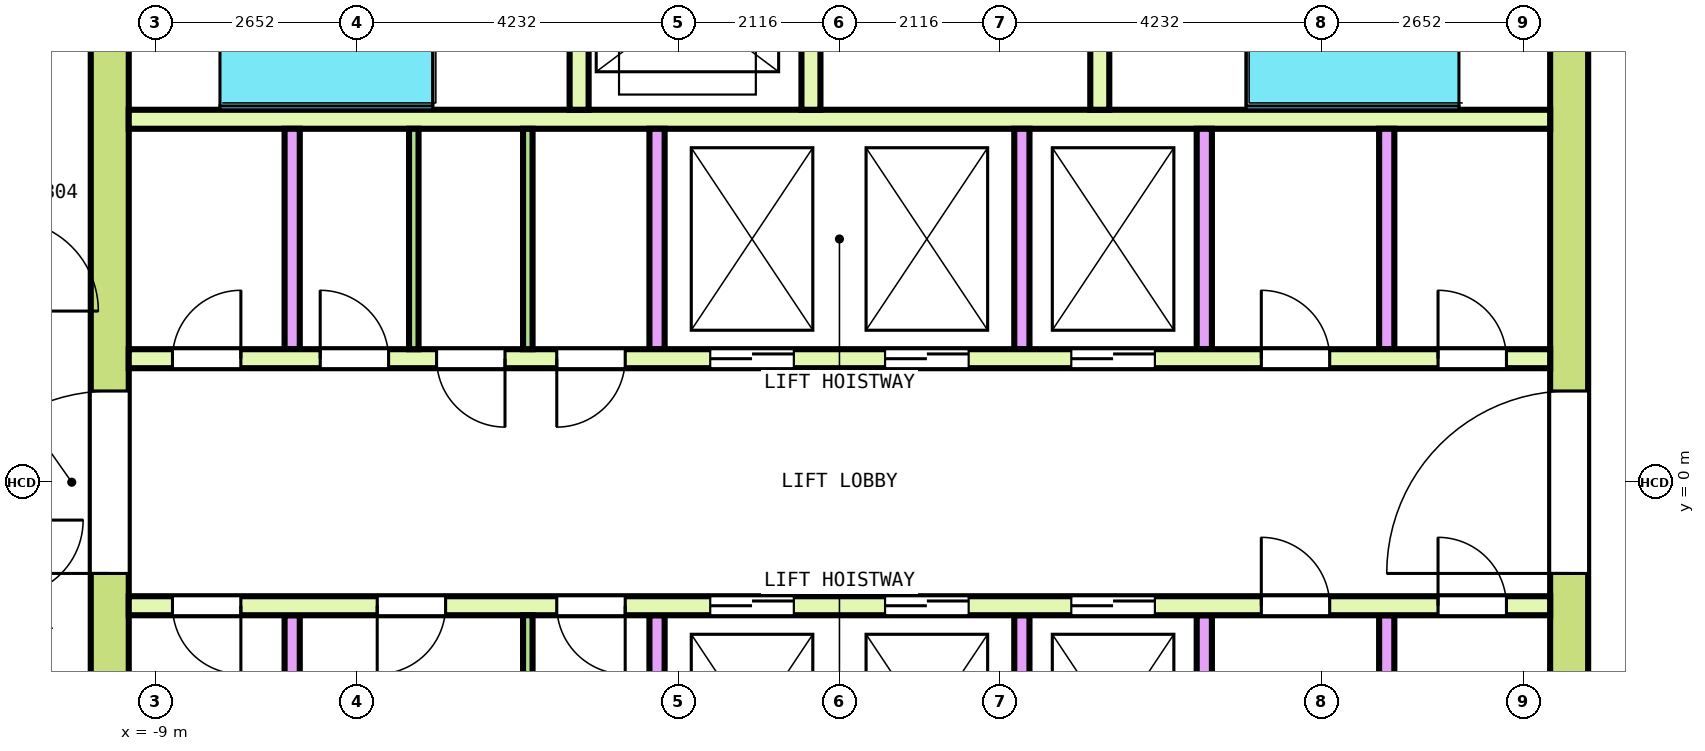
"""IFC4 building model, lengths in metres.
Left out: names, types, materials, properties, quantities, classifications, styles, units other than length and angle.
Written with IfcOpenShell. Run it as: python <this file> out.ifc"""

import sys

from ifc_helpers import new_model, si_unit, direction, frame, frame_2d, origin, place, context, subcontext, project, spatial, rectangle, extrude, element, fill, save


model = new_model("IFC4")
c1 = context("Model", 3, precision=1e-05, world=origin(), true_north=direction((0.0, 1.0)))
c2 = subcontext(c1, "Body", "Model", "MODEL_VIEW")
j1 = project(units=[si_unit("LENGTHUNIT", "METRE"), si_unit("PLANEANGLEUNIT", "RADIAN")], contexts=[c1])
p1 = place(None, origin())
s1 = spatial("IfcSite", under=j1, at=p1, CompositionType="ELEMENT")
p2 = place(p1, origin())
s2 = spatial("IfcBuilding", under=s1, at=p2, CompositionType="ELEMENT")
p3 = place(p2, frame((0.0, 0.0, 312.6)))
s3 = spatial("IfcBuildingStorey", under=s2, at=p3, CompositionType="ELEMENT", Elevation=312.6)
p4 = place(p3, frame((-9.6, -7.85, 0.0), z_axis=(0.0, 0.0, 1.0), x_axis=(0.0, 1.0, 0.0)))
e1 = element("IfcWall", 1, at=p4, inside=s3, PredefinedType="SHEAR", context=c2, shape_type="SweptSolid", body=[
    extrude(rectangle(XDim=15.7, YDim=0.5, at=frame_2d((7.85, 0.0))), origin(), (0.0, 0.0, 1.0), 3.7),
])
p5 = place(p4, frame((6.65, 0.0, 0.0)))
e2 = element("IfcOpeningElement", 2, at=p5, cuts=e1, PredefinedType="OPENING", context=c2, shape_type="SweptSolid", body=[
    extrude(rectangle(XDim=2.4, YDim=2.1, at=frame_2d((1.2, 1.05))), frame((0.0, 0.26, 0.0), z_axis=(0.0, -1.0, 0.0), x_axis=(1.0, 0.0, 0.0)), (0.0, 0.0, 1.0), 0.52),
])
p6 = place(p4, frame((13.55, 0.0, 0.0)))
e3 = element("IfcOpeningElement", 3, at=p6, cuts=e1, PredefinedType="OPENING", context=c2, shape_type="SweptSolid", body=[
    extrude(rectangle(XDim=1.2, YDim=2.1, at=frame_2d((0.6, 1.05))), frame((0.0, 0.26, 0.0), z_axis=(0.0, -1.0, 0.0), x_axis=(1.0, 0.0, 0.0)), (0.0, 0.0, 1.0), 0.52),
])
p7 = place(p4, frame((0.95, 0.0, 0.0)))
e4 = element("IfcOpeningElement", 4, at=p7, cuts=e1, PredefinedType="OPENING", context=c2, shape_type="SweptSolid", body=[
    extrude(rectangle(XDim=1.2, YDim=2.1, at=frame_2d((0.6, 1.05))), frame((0.0, 0.26, 0.0), z_axis=(0.0, -1.0, 0.0), x_axis=(1.0, 0.0, 0.0)), (0.0, 0.0, 1.0), 0.52),
])
p8 = place(p3, frame((9.6, -7.85, 0.0), z_axis=(0.0, 0.0, 1.0), x_axis=(0.0, 1.0, 0.0)))
e5 = element("IfcWall", 5, at=p8, inside=s3, PredefinedType="SHEAR", context=c2, shape_type="SweptSolid", body=[
    extrude(rectangle(XDim=15.7, YDim=0.5, at=frame_2d((7.85, 0.0))), origin(), (0.0, 0.0, 1.0), 3.7),
])
p9 = place(p8, frame((6.65, 0.0, 0.0)))
e6 = element("IfcOpeningElement", 6, at=p9, cuts=e5, PredefinedType="OPENING", context=c2, shape_type="SweptSolid", body=[
    extrude(rectangle(XDim=2.4, YDim=2.1, at=frame_2d((1.2, 1.05))), frame((0.0, 0.26, 0.0), z_axis=(0.0, -1.0, 0.0), x_axis=(1.0, 0.0, 0.0)), (0.0, 0.0, 1.0), 0.52),
])
p10 = place(p8, frame((13.55, 0.0, 0.0)))
e7 = element("IfcOpeningElement", 7, at=p10, cuts=e5, PredefinedType="OPENING", context=c2, shape_type="SweptSolid", body=[
    extrude(rectangle(XDim=1.2, YDim=2.1, at=frame_2d((0.6, 1.05))), frame((0.0, 0.26, 0.0), z_axis=(0.0, -1.0, 0.0), x_axis=(1.0, 0.0, 0.0)), (0.0, 0.0, 1.0), 0.52),
])
p11 = place(p8, frame((1.05, 0.0, 0.0)))
e8 = element("IfcOpeningElement", 8, at=p11, cuts=e5, PredefinedType="OPENING", context=c2, shape_type="SweptSolid", body=[
    extrude(rectangle(XDim=1.0, YDim=2.1, at=frame_2d((0.5, 1.05))), frame((0.0, 0.26, 0.0), z_axis=(0.0, -1.0, 0.0), x_axis=(1.0, 0.0, 0.0)), (0.0, 0.0, 1.0), 0.52),
])
p12 = place(p3, frame((-9.35, 1.625, 0.0), z_axis=(0.0, 0.0, 1.0), x_axis=(1.0, 0.0, 0.0)))
e9 = element("IfcWall", 9, at=p12, inside=s3, PredefinedType="SOLIDWALL", context=c2, shape_type="SweptSolid", body=[
    extrude(rectangle(XDim=18.7, YDim=0.25, at=frame_2d((9.35, 0.0))), origin(), (0.0, 0.0, 1.0), 3.7),
])
p13 = place(p12, frame((7.65, 0.0, 0.0)))
e10 = element("IfcOpeningElement", 10, at=p13, cuts=e9, PredefinedType="OPENING", context=c2, shape_type="SweptSolid", body=[
    extrude(rectangle(XDim=1.1, YDim=2.1, at=frame_2d((0.55, 1.05))), frame((0.0, 0.135, 0.0), z_axis=(0.0, -1.0, 0.0), x_axis=(1.0, 0.0, 0.0)), (0.0, 0.0, 1.0), 0.27),
])
p14 = place(p12, frame((9.95, 0.0, 0.0)))
e11 = element("IfcOpeningElement", 11, at=p14, cuts=e9, PredefinedType="OPENING", context=c2, shape_type="SweptSolid", body=[
    extrude(rectangle(XDim=1.1, YDim=2.1, at=frame_2d((0.55, 1.05))), frame((0.0, 0.135, 0.0), z_axis=(0.0, -1.0, 0.0), x_axis=(1.0, 0.0, 0.0)), (0.0, 0.0, 1.0), 0.27),
])
p15 = place(p12, frame((12.4, 0.0, 0.0)))
e12 = element("IfcOpeningElement", 12, at=p15, cuts=e9, PredefinedType="OPENING", context=c2, shape_type="SweptSolid", body=[
    extrude(rectangle(XDim=1.1, YDim=2.1, at=frame_2d((0.55, 1.05))), frame((0.0, 0.135, 0.0), z_axis=(0.0, -1.0, 0.0), x_axis=(1.0, 0.0, 0.0)), (0.0, 0.0, 1.0), 0.27),
])
p16 = place(p12, frame((0.575, 0.0, 0.0)))
e13 = element("IfcOpeningElement", 13, at=p16, cuts=e9, PredefinedType="OPENING", context=c2, shape_type="SweptSolid", body=[
    extrude(rectangle(XDim=0.9, YDim=2.1, at=frame_2d((0.45, 1.05))), frame((0.0, 0.135, 0.0), z_axis=(0.0, -1.0, 0.0), x_axis=(1.0, 0.0, 0.0)), (0.0, 0.0, 1.0), 0.27),
])
p17 = place(p12, frame((2.519, 0.0, 0.0)))
e14 = element("IfcOpeningElement", 14, at=p17, cuts=e9, PredefinedType="OPENING", context=c2, shape_type="SweptSolid", body=[
    extrude(rectangle(XDim=0.9, YDim=2.1, at=frame_2d((0.45, 1.05))), frame((0.0, 0.135, 0.0), z_axis=(0.0, -1.0, 0.0), x_axis=(1.0, 0.0, 0.0)), (0.0, 0.0, 1.0), 0.27),
])
p18 = place(p12, frame((4.05, 0.0, 0.0)))
e15 = element("IfcOpeningElement", 15, at=p18, cuts=e9, PredefinedType="OPENING", context=c2, shape_type="SweptSolid", body=[
    extrude(rectangle(XDim=0.9, YDim=2.1, at=frame_2d((0.45, 1.05))), frame((0.0, 0.135, 0.0), z_axis=(0.0, -1.0, 0.0), x_axis=(1.0, 0.0, 0.0)), (0.0, 0.0, 1.0), 0.27),
])
p19 = place(p12, frame((5.631, 0.0, 0.0)))
e16 = element("IfcOpeningElement", 16, at=p19, cuts=e9, PredefinedType="OPENING", context=c2, shape_type="SweptSolid", body=[
    extrude(rectangle(XDim=0.9, YDim=2.1, at=frame_2d((0.45, 1.05))), frame((0.0, 0.135, 0.0), z_axis=(0.0, -1.0, 0.0), x_axis=(1.0, 0.0, 0.0)), (0.0, 0.0, 1.0), 0.27),
])
p20 = place(p12, frame((14.9, 0.0, 0.0)))
e17 = element("IfcOpeningElement", 17, at=p20, cuts=e9, PredefinedType="OPENING", context=c2, shape_type="SweptSolid", body=[
    extrude(rectangle(XDim=0.9, YDim=2.1, at=frame_2d((0.45, 1.05))), frame((0.0, 0.135, 0.0), z_axis=(0.0, -1.0, 0.0), x_axis=(1.0, 0.0, 0.0)), (0.0, 0.0, 1.0), 0.27),
])
p21 = place(p12, frame((17.225, 0.0, 0.0)))
e18 = element("IfcOpeningElement", 18, at=p21, cuts=e9, PredefinedType="OPENING", context=c2, shape_type="SweptSolid", body=[
    extrude(rectangle(XDim=0.9, YDim=2.1, at=frame_2d((0.45, 1.05))), frame((0.0, 0.135, 0.0), z_axis=(0.0, -1.0, 0.0), x_axis=(1.0, 0.0, 0.0)), (0.0, 0.0, 1.0), 0.27),
])
p22 = place(p3, frame((-9.35, 4.775, 0.0), z_axis=(0.0, 0.0, 1.0), x_axis=(1.0, 0.0, 0.0)))
e19 = element("IfcWall", 19, at=p22, inside=s3, PredefinedType="SOLIDWALL", context=c2, shape_type="SweptSolid", body=[
    extrude(rectangle(XDim=18.7, YDim=0.25, at=frame_2d((9.35, 0.0))), origin(), (0.0, 0.0, 1.0), 3.7),
])
for number, where, z_axis, x_axis in (
    (20, (-7.2, 1.75, 0.0), (0.0, 0.0, 1.0), (0.0, 1.0, 0.0)),
    (21, (-2.4, 1.75, 0.0), (0.0, 0.0, 1.0), (0.0, 1.0, 0.0)),
    (22, (2.4, 1.75, 0.0), (0.0, 0.0, 1.0), (0.0, 1.0, 0.0)),
    (23, (4.8, 1.75, 0.0), (0.0, 0.0, 1.0), (0.0, 1.0, 0.0)),
    (24, (7.2, 1.75, 0.0), (0.0, 0.0, 1.0), (0.0, 1.0, 0.0)),
):
    element("IfcWall", number, at=place(p3, frame(where, z_axis=z_axis, x_axis=x_axis)), inside=s3, PredefinedType="SOLIDWALL", context=c2, shape_type="SweptSolid", body=[
        extrude(rectangle(XDim=2.9, YDim=0.2, at=frame_2d((1.45, 0.0))), origin(), (0.0, 0.0, 1.0), 3.7),
    ])
p23 = place(p3, frame((-9.35, -1.625, 0.0), z_axis=(0.0, 0.0, 1.0), x_axis=(1.0, 0.0, 0.0)))
e25 = element("IfcWall", 25, at=p23, inside=s3, PredefinedType="SOLIDWALL", context=c2, shape_type="SweptSolid", body=[
    extrude(rectangle(XDim=18.7, YDim=0.25, at=frame_2d((9.35, 0.0))), origin(), (0.0, 0.0, 1.0), 3.7),
])
p24 = place(p23, frame((7.65, 0.0, 0.0)))
e26 = element("IfcOpeningElement", 26, at=p24, cuts=e25, PredefinedType="OPENING", context=c2, shape_type="SweptSolid", body=[
    extrude(rectangle(XDim=1.1, YDim=2.1, at=frame_2d((0.55, 1.05))), frame((0.0, 0.135, 0.0), z_axis=(0.0, -1.0, 0.0), x_axis=(1.0, 0.0, 0.0)), (0.0, 0.0, 1.0), 0.27),
])
p25 = place(p23, frame((9.95, 0.0, 0.0)))
e27 = element("IfcOpeningElement", 27, at=p25, cuts=e25, PredefinedType="OPENING", context=c2, shape_type="SweptSolid", body=[
    extrude(rectangle(XDim=1.1, YDim=2.1, at=frame_2d((0.55, 1.05))), frame((0.0, 0.135, 0.0), z_axis=(0.0, -1.0, 0.0), x_axis=(1.0, 0.0, 0.0)), (0.0, 0.0, 1.0), 0.27),
])
p26 = place(p23, frame((12.4, 0.0, 0.0)))
e28 = element("IfcOpeningElement", 28, at=p26, cuts=e25, PredefinedType="OPENING", context=c2, shape_type="SweptSolid", body=[
    extrude(rectangle(XDim=1.1, YDim=2.1, at=frame_2d((0.55, 1.05))), frame((0.0, 0.135, 0.0), z_axis=(0.0, -1.0, 0.0), x_axis=(1.0, 0.0, 0.0)), (0.0, 0.0, 1.0), 0.27),
])
p27 = place(p23, frame((0.575, 0.0, 0.0)))
e29 = element("IfcOpeningElement", 29, at=p27, cuts=e25, PredefinedType="OPENING", context=c2, shape_type="SweptSolid", body=[
    extrude(rectangle(XDim=0.9, YDim=2.1, at=frame_2d((0.45, 1.05))), frame((0.0, 0.135, 0.0), z_axis=(0.0, -1.0, 0.0), x_axis=(1.0, 0.0, 0.0)), (0.0, 0.0, 1.0), 0.27),
])
p28 = place(p23, frame((3.269, 0.0, 0.0)))
e30 = element("IfcOpeningElement", 30, at=p28, cuts=e25, PredefinedType="OPENING", context=c2, shape_type="SweptSolid", body=[
    extrude(rectangle(XDim=0.9, YDim=2.1, at=frame_2d((0.45, 1.05))), frame((0.0, 0.135, 0.0), z_axis=(0.0, -1.0, 0.0), x_axis=(1.0, 0.0, 0.0)), (0.0, 0.0, 1.0), 0.27),
])
p29 = place(p23, frame((5.631, 0.0, 0.0)))
e31 = element("IfcOpeningElement", 31, at=p29, cuts=e25, PredefinedType="OPENING", context=c2, shape_type="SweptSolid", body=[
    extrude(rectangle(XDim=0.9, YDim=2.1, at=frame_2d((0.45, 1.05))), frame((0.0, 0.135, 0.0), z_axis=(0.0, -1.0, 0.0), x_axis=(1.0, 0.0, 0.0)), (0.0, 0.0, 1.0), 0.27),
])
p30 = place(p23, frame((14.9, 0.0, 0.0)))
e32 = element("IfcOpeningElement", 32, at=p30, cuts=e25, PredefinedType="OPENING", context=c2, shape_type="SweptSolid", body=[
    extrude(rectangle(XDim=0.9, YDim=2.1, at=frame_2d((0.45, 1.05))), frame((0.0, 0.135, 0.0), z_axis=(0.0, -1.0, 0.0), x_axis=(1.0, 0.0, 0.0)), (0.0, 0.0, 1.0), 0.27),
])
p31 = place(p23, frame((17.225, 0.0, 0.0)))
e33 = element("IfcOpeningElement", 33, at=p31, cuts=e25, PredefinedType="OPENING", context=c2, shape_type="SweptSolid", body=[
    extrude(rectangle(XDim=0.9, YDim=2.1, at=frame_2d((0.45, 1.05))), frame((0.0, 0.135, 0.0), z_axis=(0.0, -1.0, 0.0), x_axis=(1.0, 0.0, 0.0)), (0.0, 0.0, 1.0), 0.27),
])
for number, where, z_axis, x_axis in (
    (34, (-7.2, -4.65, 0.0), (0.0, 0.0, 1.0), (0.0, 1.0, 0.0)),
    (35, (-2.4, -4.65, 0.0), (0.0, 0.0, 1.0), (0.0, 1.0, 0.0)),
    (36, (2.4, -4.65, 0.0), (0.0, 0.0, 1.0), (0.0, 1.0, 0.0)),
    (37, (4.8, -4.65, 0.0), (0.0, 0.0, 1.0), (0.0, 1.0, 0.0)),
    (38, (7.2, -4.65, 0.0), (0.0, 0.0, 1.0), (0.0, 1.0, 0.0)),
):
    element("IfcWall", number, at=place(p3, frame(where, z_axis=z_axis, x_axis=x_axis)), inside=s3, PredefinedType="SOLIDWALL", context=c2, shape_type="SweptSolid", body=[
        extrude(rectangle(XDim=2.9, YDim=0.2, at=frame_2d((1.45, 0.0))), origin(), (0.0, 0.0, 1.0), 3.7),
    ])
p32 = place(p3, frame((-3.425, 4.9, 0.0), z_axis=(0.0, 0.0, 1.0), x_axis=(0.0, 1.0, 0.0)))
e39 = element("IfcWall", 39, at=p32, inside=s3, PredefinedType="SOLIDWALL", context=c2, shape_type="SweptSolid", body=[
    extrude(rectangle(XDim=2.95, YDim=0.25, at=frame_2d((1.475, 0.0))), origin(), (0.0, 0.0, 1.0), 3.7),
])
p33 = place(p3, frame((-0.375, 4.9, 0.0), z_axis=(0.0, 0.0, 1.0), x_axis=(0.0, 1.0, 0.0)))
e40 = element("IfcWall", 40, at=p33, inside=s3, PredefinedType="SOLIDWALL", context=c2, shape_type="SweptSolid", body=[
    extrude(rectangle(XDim=2.95, YDim=0.25, at=frame_2d((1.475, 0.0))), origin(), (0.0, 0.0, 1.0), 3.7),
])
p34 = place(p33, frame((0.775, 0.0, 0.0)))
e41 = element("IfcOpeningElement", 41, at=p34, cuts=e40, PredefinedType="OPENING", context=c2, shape_type="SweptSolid", body=[
    extrude(rectangle(XDim=1.4, YDim=2.1, at=frame_2d((0.7, 1.05))), frame((0.0, 0.135, 0.0), z_axis=(0.0, -1.0, 0.0), x_axis=(1.0, 0.0, 0.0)), (0.0, 0.0, 1.0), 0.27),
])
p35 = place(p3, frame((3.425, 4.9, 0.0), z_axis=(0.0, 0.0, 1.0), x_axis=(0.0, 1.0, 0.0)))
e42 = element("IfcWall", 42, at=p35, inside=s3, PredefinedType="SOLIDWALL", context=c2, shape_type="SweptSolid", body=[
    extrude(rectangle(XDim=2.95, YDim=0.25, at=frame_2d((1.475, 0.0))), origin(), (0.0, 0.0, 1.0), 3.7),
])
for number, where, z_axis, x_axis in (
    (43, (-5.6, 1.75, 0.0), (0.0, 0.0, 1.0), (0.0, 1.0, 0.0)),
    (44, (-4.1, 1.75, 0.0), (0.0, 0.0, 1.0), (0.0, 1.0, 0.0)),
    (45, (-4.1, -4.65, 0.0), (0.0, 0.0, 1.0), (0.0, 1.0, 0.0)),
):
    element("IfcWall", number, at=place(p3, frame(where, z_axis=z_axis, x_axis=x_axis)), inside=s3, PredefinedType="PARTITIONING", context=c2, shape_type="SweptSolid", body=[
        extrude(rectangle(XDim=2.9, YDim=0.125, at=frame_2d((1.45, 0.0))), origin(), (0.0, 0.0, 1.0), 3.7),
    ])
p36 = place(p13, origin())
e46 = element("IfcDoor", 46, at=p36, inside=s3, OperationType="DOUBLE_DOOR_SLIDING", PredefinedType="DOOR", context=c2, shape_type="SweptSolid", body=[
    extrude(rectangle(XDim=1.1, YDim=2.1, at=frame_2d((0.55, 1.05))), frame((0.0, 0.075, 0.0), z_axis=(0.0, -1.0, 0.0), x_axis=(1.0, 0.0, 0.0)), (0.0, 0.0, 1.0), 0.15),
])
fill(e10, e46)
p37 = place(p14, origin())
e47 = element("IfcDoor", 47, at=p37, inside=s3, OperationType="DOUBLE_DOOR_SLIDING", PredefinedType="DOOR", context=c2, shape_type="SweptSolid", body=[
    extrude(rectangle(XDim=1.1, YDim=2.1, at=frame_2d((0.55, 1.05))), frame((0.0, 0.075, 0.0), z_axis=(0.0, -1.0, 0.0), x_axis=(1.0, 0.0, 0.0)), (0.0, 0.0, 1.0), 0.15),
])
fill(e11, e47)
p38 = place(p15, origin())
e48 = element("IfcDoor", 48, at=p38, inside=s3, OperationType="DOUBLE_DOOR_SLIDING", PredefinedType="DOOR", context=c2, shape_type="SweptSolid", body=[
    extrude(rectangle(XDim=1.1, YDim=2.1, at=frame_2d((0.55, 1.05))), frame((0.0, 0.075, 0.0), z_axis=(0.0, -1.0, 0.0), x_axis=(1.0, 0.0, 0.0)), (0.0, 0.0, 1.0), 0.15),
])
fill(e12, e48)
p39 = place(p24, origin())
e49 = element("IfcDoor", 49, at=p39, inside=s3, OperationType="DOUBLE_DOOR_SLIDING", PredefinedType="DOOR", context=c2, shape_type="SweptSolid", body=[
    extrude(rectangle(XDim=1.1, YDim=2.1, at=frame_2d((0.55, 1.05))), frame((0.0, 0.075, 0.0), z_axis=(0.0, -1.0, 0.0), x_axis=(1.0, 0.0, 0.0)), (0.0, 0.0, 1.0), 0.15),
])
fill(e26, e49)
p40 = place(p25, origin())
e50 = element("IfcDoor", 50, at=p40, inside=s3, OperationType="DOUBLE_DOOR_SLIDING", PredefinedType="DOOR", context=c2, shape_type="SweptSolid", body=[
    extrude(rectangle(XDim=1.1, YDim=2.1, at=frame_2d((0.55, 1.05))), frame((0.0, 0.075, 0.0), z_axis=(0.0, -1.0, 0.0), x_axis=(1.0, 0.0, 0.0)), (0.0, 0.0, 1.0), 0.15),
])
fill(e27, e50)
p41 = place(p26, origin())
e51 = element("IfcDoor", 51, at=p41, inside=s3, OperationType="DOUBLE_DOOR_SLIDING", PredefinedType="DOOR", context=c2, shape_type="SweptSolid", body=[
    extrude(rectangle(XDim=1.1, YDim=2.1, at=frame_2d((0.55, 1.05))), frame((0.0, 0.075, 0.0), z_axis=(0.0, -1.0, 0.0), x_axis=(1.0, 0.0, 0.0)), (0.0, 0.0, 1.0), 0.15),
])
fill(e28, e51)
p42 = place(p5, origin())
e52 = element("IfcDoor", 52, at=p42, inside=s3, OperationType="DOUBLE_DOOR_SINGLE_SWING", PredefinedType="DOOR", context=c2, shape_type="SweptSolid", body=[
    extrude(rectangle(XDim=2.4, YDim=2.1, at=frame_2d((1.2, 1.05))), frame((0.0, 0.2, 0.0), z_axis=(0.0, -1.0, 0.0), x_axis=(1.0, 0.0, 0.0)), (0.0, 0.0, 1.0), 0.4),
])
fill(e2, e52)
p43 = place(p9, origin())
e53 = element("IfcDoor", 53, at=p43, inside=s3, OperationType="DOUBLE_DOOR_SINGLE_SWING", PredefinedType="DOOR", context=c2, shape_type="SweptSolid", body=[
    extrude(rectangle(XDim=2.4, YDim=2.1, at=frame_2d((1.2, 1.05))), frame((0.0, 0.2, 0.0), z_axis=(0.0, -1.0, 0.0), x_axis=(1.0, 0.0, 0.0)), (0.0, 0.0, 1.0), 0.4),
])
fill(e6, e53)
p44 = place(p16, origin())
e54 = element("IfcDoor", 54, at=p44, inside=s3, OperationType="SINGLE_SWING_RIGHT", PredefinedType="DOOR", context=c2, shape_type="SweptSolid", body=[
    extrude(rectangle(XDim=0.9, YDim=2.1, at=frame_2d((0.45, 1.05))), frame((0.0, 0.075, 0.0), z_axis=(0.0, -1.0, 0.0), x_axis=(1.0, 0.0, 0.0)), (0.0, 0.0, 1.0), 0.15),
])
fill(e13, e54)
p45 = place(p17, origin())
e55 = element("IfcDoor", 55, at=p45, inside=s3, OperationType="SINGLE_SWING_LEFT", PredefinedType="DOOR", context=c2, shape_type="SweptSolid", body=[
    extrude(rectangle(XDim=0.9, YDim=2.1, at=frame_2d((0.45, 1.05))), frame((0.0, 0.075, 0.0), z_axis=(0.0, -1.0, 0.0), x_axis=(1.0, 0.0, 0.0)), (0.0, 0.0, 1.0), 0.15),
])
fill(e14, e55)
p46 = place(p18, origin())
e56 = element("IfcDoor", 56, at=p46, inside=s3, OperationType="SINGLE_SWING_RIGHT", PredefinedType="DOOR", context=c2, shape_type="SweptSolid", body=[
    extrude(rectangle(XDim=0.9, YDim=2.1, at=frame_2d((0.45, 1.05))), frame((0.0, 0.075, 0.0), z_axis=(0.0, -1.0, 0.0), x_axis=(1.0, 0.0, 0.0)), (0.0, 0.0, 1.0), 0.15),
])
fill(e15, e56)
p47 = place(p19, origin())
e57 = element("IfcDoor", 57, at=p47, inside=s3, OperationType="SINGLE_SWING_LEFT", PredefinedType="DOOR", context=c2, shape_type="SweptSolid", body=[
    extrude(rectangle(XDim=0.9, YDim=2.1, at=frame_2d((0.45, 1.05))), frame((0.0, 0.075, 0.0), z_axis=(0.0, -1.0, 0.0), x_axis=(1.0, 0.0, 0.0)), (0.0, 0.0, 1.0), 0.15),
])
fill(e16, e57)
p48 = place(p20, origin())
e58 = element("IfcDoor", 58, at=p48, inside=s3, OperationType="SINGLE_SWING_RIGHT", PredefinedType="DOOR", context=c2, shape_type="SweptSolid", body=[
    extrude(rectangle(XDim=0.9, YDim=2.1, at=frame_2d((0.45, 1.05))), frame((0.0, 0.075, 0.0), z_axis=(0.0, -1.0, 0.0), x_axis=(1.0, 0.0, 0.0)), (0.0, 0.0, 1.0), 0.15),
])
fill(e17, e58)
p49 = place(p21, origin())
e59 = element("IfcDoor", 59, at=p49, inside=s3, OperationType="SINGLE_SWING_LEFT", PredefinedType="DOOR", context=c2, shape_type="SweptSolid", body=[
    extrude(rectangle(XDim=0.9, YDim=2.1, at=frame_2d((0.45, 1.05))), frame((0.0, 0.075, 0.0), z_axis=(0.0, -1.0, 0.0), x_axis=(1.0, 0.0, 0.0)), (0.0, 0.0, 1.0), 0.15),
])
fill(e18, e59)
p50 = place(p27, origin())
e60 = element("IfcDoor", 60, at=p50, inside=s3, OperationType="SINGLE_SWING_RIGHT", PredefinedType="DOOR", context=c2, shape_type="SweptSolid", body=[
    extrude(rectangle(XDim=0.9, YDim=2.1, at=frame_2d((0.45, 1.05))), frame((0.0, 0.075, 0.0), z_axis=(0.0, -1.0, 0.0), x_axis=(1.0, 0.0, 0.0)), (0.0, 0.0, 1.0), 0.15),
])
fill(e29, e60)
p51 = place(p28, origin())
e61 = element("IfcDoor", 61, at=p51, inside=s3, OperationType="SINGLE_SWING_LEFT", PredefinedType="DOOR", context=c2, shape_type="SweptSolid", body=[
    extrude(rectangle(XDim=0.9, YDim=2.1, at=frame_2d((0.45, 1.05))), frame((0.0, 0.075, 0.0), z_axis=(0.0, -1.0, 0.0), x_axis=(1.0, 0.0, 0.0)), (0.0, 0.0, 1.0), 0.15),
])
fill(e30, e61)
p52 = place(p29, origin())
e62 = element("IfcDoor", 62, at=p52, inside=s3, OperationType="SINGLE_SWING_RIGHT", PredefinedType="DOOR", context=c2, shape_type="SweptSolid", body=[
    extrude(rectangle(XDim=0.9, YDim=2.1, at=frame_2d((0.45, 1.05))), frame((0.0, 0.075, 0.0), z_axis=(0.0, -1.0, 0.0), x_axis=(1.0, 0.0, 0.0)), (0.0, 0.0, 1.0), 0.15),
])
fill(e31, e62)
p53 = place(p30, origin())
e63 = element("IfcDoor", 63, at=p53, inside=s3, OperationType="SINGLE_SWING_LEFT", PredefinedType="DOOR", context=c2, shape_type="SweptSolid", body=[
    extrude(rectangle(XDim=0.9, YDim=2.1, at=frame_2d((0.45, 1.05))), frame((0.0, 0.075, 0.0), z_axis=(0.0, -1.0, 0.0), x_axis=(1.0, 0.0, 0.0)), (0.0, 0.0, 1.0), 0.15),
])
fill(e32, e63)
p54 = place(p31, origin())
e64 = element("IfcDoor", 64, at=p54, inside=s3, OperationType="SINGLE_SWING_RIGHT", PredefinedType="DOOR", context=c2, shape_type="SweptSolid", body=[
    extrude(rectangle(XDim=0.9, YDim=2.1, at=frame_2d((0.45, 1.05))), frame((0.0, 0.075, 0.0), z_axis=(0.0, -1.0, 0.0), x_axis=(1.0, 0.0, 0.0)), (0.0, 0.0, 1.0), 0.15),
])
fill(e33, e64)
save(model, sys.argv[1])
